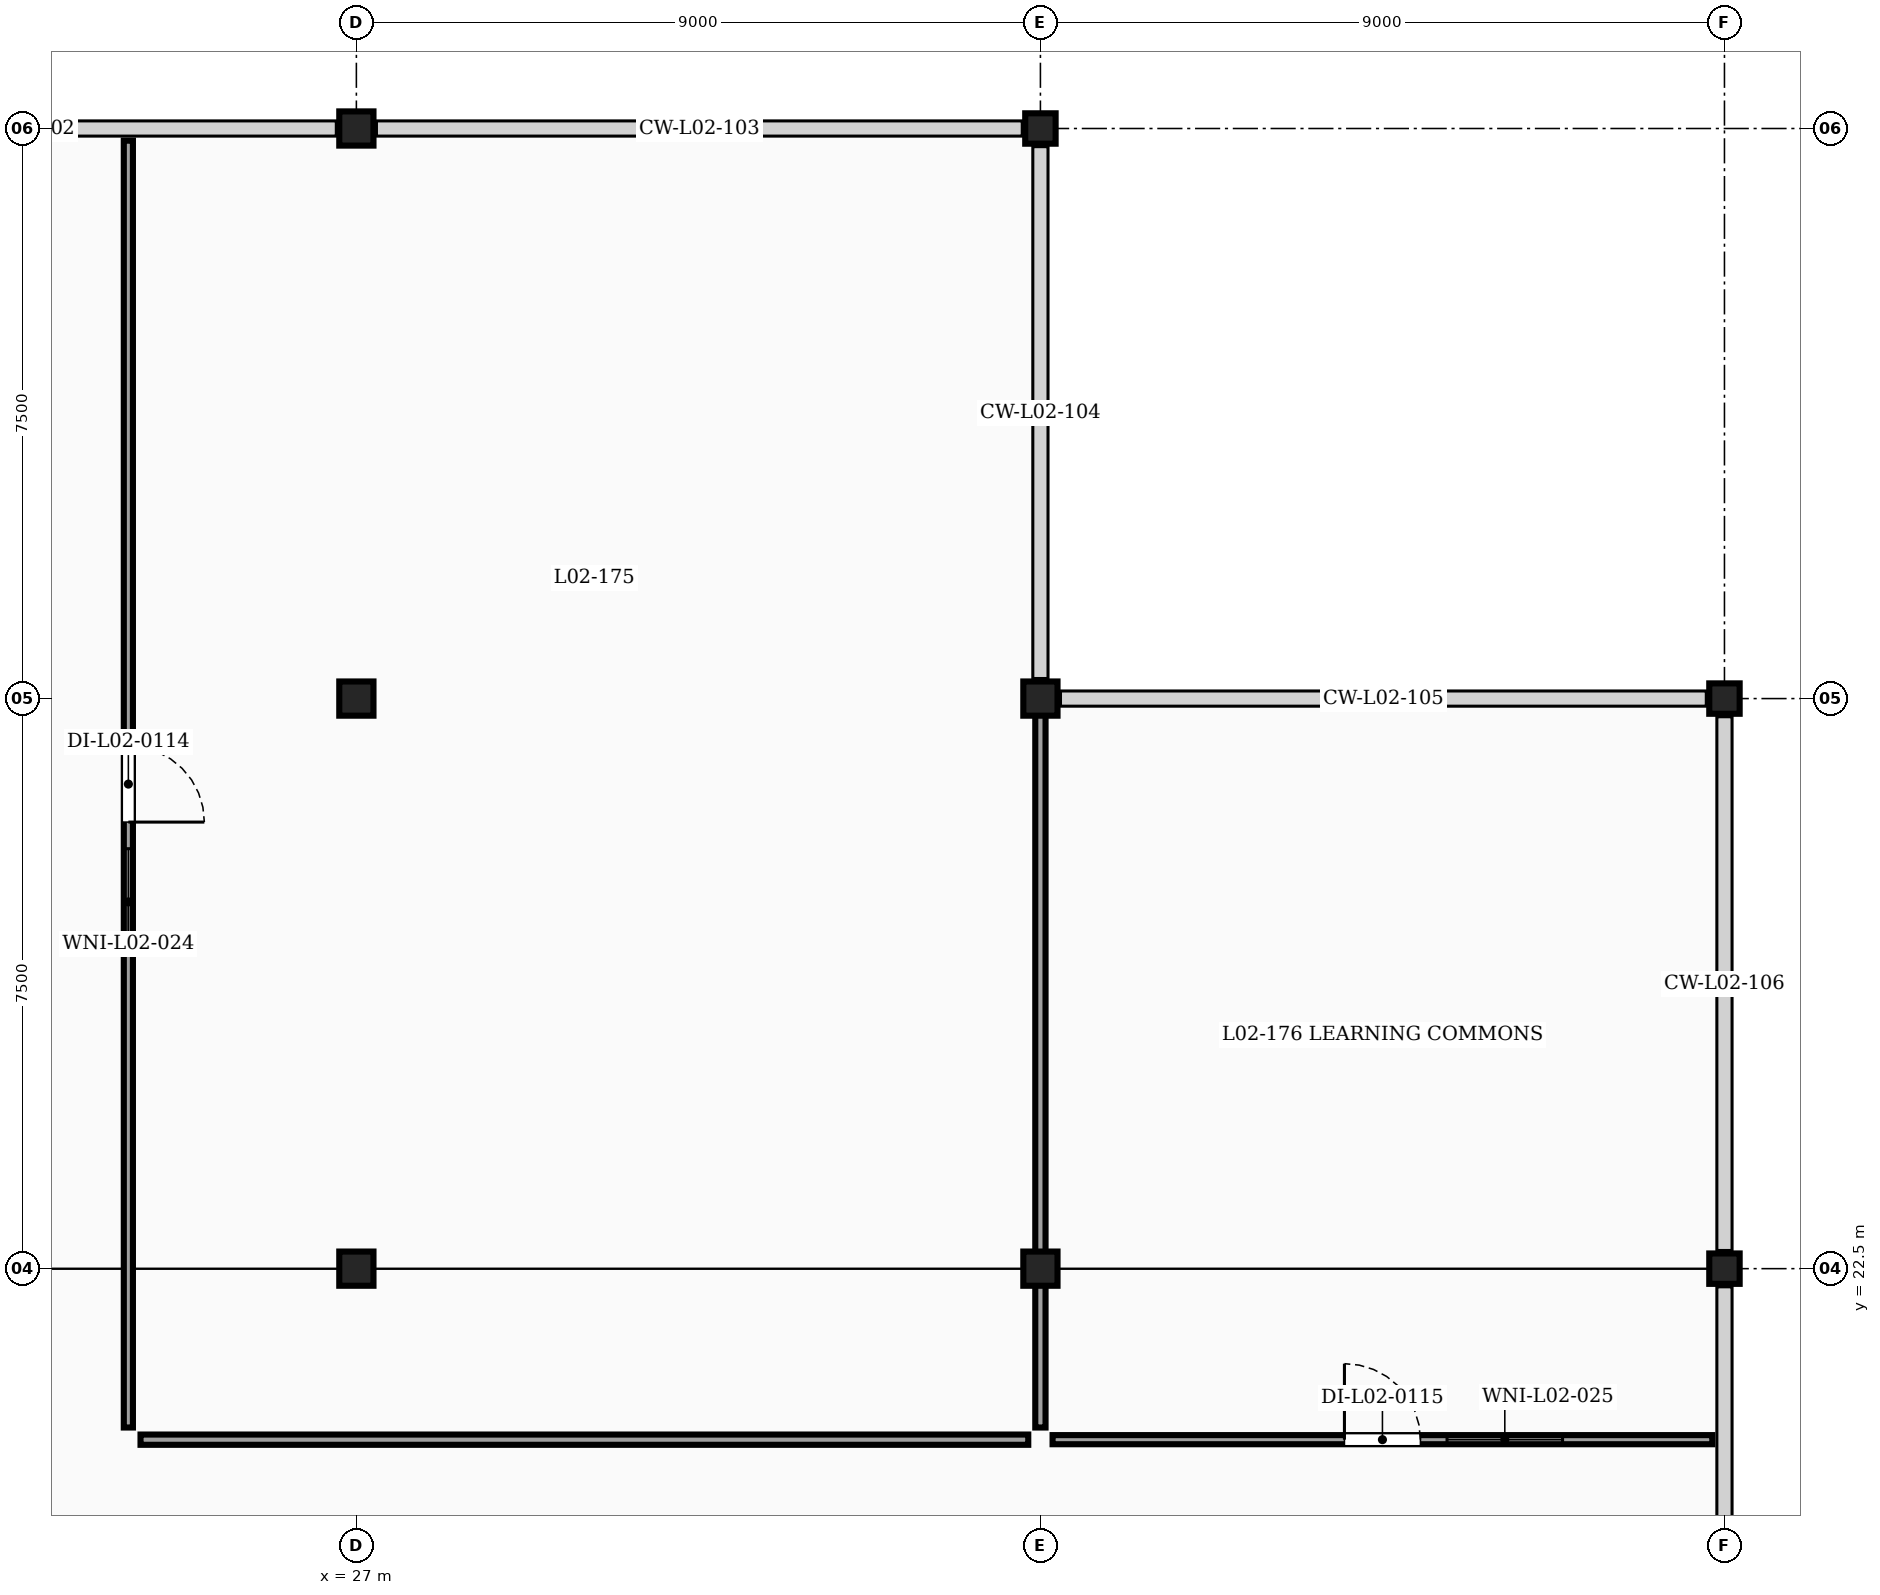
"""IFC4 building model, lengths in metres.
Left out: names, types, materials, properties, quantities, classifications, styles, units other than length and angle.
Written with IfcOpenShell. Run it as: python <this file> out.ifc"""

import sys

from ifc_helpers import new_model, si_unit, direction, frame, frame_2d, origin, origin_2d, place, context, subcontext, project, spatial, rectangle, extrude, element, fill, save


model = new_model("IFC4")
c1 = context("Model", 3, precision=1e-05, world=origin(), true_north=direction((0.0, 1.0)))
c2 = subcontext(c1, "Body", "Model", "MODEL_VIEW")
j1 = project(units=[si_unit("LENGTHUNIT", "METRE"), si_unit("PLANEANGLEUNIT", "RADIAN")], contexts=[c1])
p1 = place(None, origin())
s1 = spatial("IfcSite", under=j1, at=p1, CompositionType="ELEMENT")
p2 = place(p1, origin())
s2 = spatial("IfcBuilding", under=s1, at=p2, CompositionType="ELEMENT")
p3 = place(p2, frame((0.0, 0.0, 8.5)))
s3 = spatial("IfcBuildingStorey", under=s2, at=p3, CompositionType="ELEMENT", Elevation=8.5)
for number, where, z_axis, x_axis in (
    (1, (27.0, 22.5, 0.0), (0.0, 0.0, 1.0), (1.0, 0.0, 0.0)),
    (2, (36.0, 22.5, 0.0), (0.0, 0.0, 1.0), (1.0, 0.0, 0.0)),
):
    element("IfcColumn", number, at=place(p3, frame(where, z_axis=z_axis, x_axis=x_axis)), inside=s3, PredefinedType="COLUMN", context=c2, shape_type="SweptSolid", body=[
        extrude(rectangle(XDim=0.45, YDim=0.45, at=origin_2d()), origin(), (0.0, 0.0, 1.0), 3.8),
    ])
p4 = place(p3, frame((45.0, 22.5, 0.0), z_axis=(0.0, 0.0, 1.0), x_axis=(1.0, 0.0, 0.0)))
e3 = element("IfcColumn", 3, at=p4, inside=s3, PredefinedType="COLUMN", context=c2, shape_type="SweptSolid", body=[
    extrude(rectangle(XDim=0.4, YDim=0.4, at=origin_2d()), origin(), (0.0, 0.0, 1.0), 3.8),
])
for number, where, z_axis, x_axis in (
    (4, (27.0, 30.0, 0.0), (0.0, 0.0, 1.0), (1.0, 0.0, 0.0)),
    (5, (36.0, 30.0, 0.0), (0.0, 0.0, 1.0), (1.0, 0.0, 0.0)),
):
    element("IfcColumn", number, at=place(p3, frame(where, z_axis=z_axis, x_axis=x_axis)), inside=s3, PredefinedType="COLUMN", context=c2, shape_type="SweptSolid", body=[
        extrude(rectangle(XDim=0.45, YDim=0.45, at=origin_2d()), origin(), (0.0, 0.0, 1.0), 3.8),
    ])
p5 = place(p3, frame((45.0, 30.0, 0.0), z_axis=(0.0, 0.0, 1.0), x_axis=(1.0, 0.0, 0.0)))
e6 = element("IfcColumn", 6, at=p5, inside=s3, PredefinedType="COLUMN", context=c2, shape_type="SweptSolid", body=[
    extrude(rectangle(XDim=0.4, YDim=0.4, at=origin_2d()), origin(), (0.0, 0.0, 1.0), 3.8),
])
p6 = place(p3, frame((27.0, 37.5, 0.0), z_axis=(0.0, 0.0, 1.0), x_axis=(1.0, 0.0, 0.0)))
e7 = element("IfcColumn", 7, at=p6, inside=s3, PredefinedType="COLUMN", context=c2, shape_type="SweptSolid", body=[
    extrude(rectangle(XDim=0.45, YDim=0.45, at=origin_2d()), origin(), (0.0, 0.0, 1.0), 3.8),
])
p7 = place(p3, frame((36.0, 37.5, 0.0), z_axis=(0.0, 0.0, 1.0), x_axis=(1.0, 0.0, 0.0)))
e8 = element("IfcColumn", 8, at=p7, inside=s3, PredefinedType="COLUMN", context=c2, shape_type="SweptSolid", body=[
    extrude(rectangle(XDim=0.4, YDim=0.4, at=origin_2d()), origin(), (0.0, 0.0, 1.0), 3.8),
])
p8 = place(p3, frame((24.0, 37.34, 0.0), z_axis=(0.0, 0.0, 1.0), x_axis=(0.0, -1.0, 0.0)))
e9 = element("IfcWall", 9, at=p8, inside=s3, PredefinedType="PARTITIONING", context=c2, shape_type="SweptSolid", body=[
    extrude(rectangle(XDim=16.93, YDim=0.12, at=frame_2d((8.465, 0.0))), origin(), (0.0, 0.0, 1.0), 3.182),
])
p9 = place(p8, frame((7.965, 0.0, 0.0)))
e10 = element("IfcOpeningElement", 10, at=p9, cuts=e9, PredefinedType="OPENING", context=c2, shape_type="SweptSolid", body=[
    extrude(rectangle(XDim=1.0, YDim=2.15, at=frame_2d((0.5, 1.075))), frame((0.0, 0.07, 0.0), z_axis=(0.0, -1.0, 0.0), x_axis=(1.0, 0.0, 0.0)), (0.0, 0.0, 1.0), 0.14),
])
p10 = place(p8, frame((9.315, 0.0, 1.02)))
e11 = element("IfcOpeningElement", 11, at=p10, cuts=e9, PredefinedType="OPENING", context=c2, shape_type="SweptSolid", body=[
    extrude(rectangle(XDim=1.4, YDim=1.2, at=frame_2d((0.7, 0.6))), frame((0.0, 0.07, 0.0), z_axis=(0.0, -1.0, 0.0), x_axis=(1.0, 0.0, 0.0)), (0.0, 0.0, 1.0), 0.14),
])
p11 = place(p3, frame((24.16, 20.25, 0.0), z_axis=(0.0, 0.0, 1.0), x_axis=(1.0, 0.0, 0.0)))
e12 = element("IfcWall", 12, at=p11, inside=s3, PredefinedType="PARTITIONING", context=c2, shape_type="SweptSolid", body=[
    extrude(rectangle(XDim=11.68, YDim=0.135, at=frame_2d((5.84, 0.0))), origin(), (0.0, 0.0, 1.0), 3.59),
])
p12 = place(p3, frame((36.16, 20.25, 0.0), z_axis=(0.0, 0.0, 1.0), x_axis=(1.0, 0.0, 0.0)))
e13 = element("IfcWall", 13, at=p12, inside=s3, PredefinedType="PARTITIONING", context=c2, shape_type="SweptSolid", body=[
    extrude(rectangle(XDim=8.68, YDim=0.12, at=frame_2d((4.34, 0.0))), origin(), (0.0, 0.0, 1.0), 3.59),
])
p13 = place(p12, frame((3.84, 0.0, 0.0)))
e14 = element("IfcOpeningElement", 14, at=p13, cuts=e13, PredefinedType="OPENING", context=c2, shape_type="SweptSolid", body=[
    extrude(rectangle(XDim=1.0, YDim=2.15, at=frame_2d((0.5, 1.075))), frame((0.0, 0.07, 0.0), z_axis=(0.0, -1.0, 0.0), x_axis=(1.0, 0.0, 0.0)), (0.0, 0.0, 1.0), 0.14),
])
p14 = place(p12, frame((5.19, 0.0, 1.02)))
e15 = element("IfcOpeningElement", 15, at=p14, cuts=e13, PredefinedType="OPENING", context=c2, shape_type="SweptSolid", body=[
    extrude(rectangle(XDim=1.52, YDim=1.16, at=frame_2d((0.76, 0.58))), frame((0.0, 0.07, 0.0), z_axis=(0.0, -1.0, 0.0), x_axis=(1.0, 0.0, 0.0)), (0.0, 0.0, 1.0), 0.14),
])
p15 = place(p3, frame((36.0, 20.41, 0.0), z_axis=(0.0, 0.0, 1.0), x_axis=(0.0, 1.0, 0.0)))
e16 = element("IfcWall", 16, at=p15, inside=s3, PredefinedType="PARTITIONING", context=c2, shape_type="SweptSolid", body=[
    extrude(rectangle(XDim=9.43, YDim=0.135, at=frame_2d((4.715, 0.0))), origin(), (0.0, 0.0, 1.0), 3.049),
])
p16 = place(p9, origin())
e17 = element("IfcDoor", 17, at=p16, inside=s3, OperationType="SINGLE_SWING_RIGHT", PredefinedType="DOOR", context=c2, shape_type="SweptSolid", body=[
    extrude(rectangle(XDim=1.0, YDim=2.15, at=frame_2d((0.5, 1.075))), frame((0.0, 0.025, 0.0), z_axis=(0.0, -1.0, 0.0), x_axis=(1.0, 0.0, 0.0)), (0.0, 0.0, 1.0), 0.05),
])
fill(e10, e17)
p17 = place(p10, origin())
e18 = element("IfcWindow", 18, at=p17, inside=s3, PartitioningType="DOUBLE_PANEL_VERTICAL", PredefinedType="WINDOW", context=c2, shape_type="SweptSolid", body=[
    extrude(rectangle(XDim=1.4, YDim=1.2, at=frame_2d((0.7, 0.6))), frame((0.0, 0.03, 0.0), z_axis=(0.0, -1.0, 0.0), x_axis=(1.0, 0.0, 0.0)), (0.0, 0.0, 1.0), 0.06),
])
fill(e11, e18)
p18 = place(p13, origin())
e19 = element("IfcDoor", 19, at=p18, inside=s3, OperationType="SINGLE_SWING_LEFT", PredefinedType="DOOR", context=c2, shape_type="SweptSolid", body=[
    extrude(rectangle(XDim=1.0, YDim=2.15, at=frame_2d((0.5, 1.075))), frame((0.0, 0.025, 0.0), z_axis=(0.0, -1.0, 0.0), x_axis=(1.0, 0.0, 0.0)), (0.0, 0.0, 1.0), 0.05),
])
fill(e14, e19)
p19 = place(p14, origin())
e20 = element("IfcWindow", 20, at=p19, inside=s3, PartitioningType="DOUBLE_PANEL_VERTICAL", PredefinedType="WINDOW", context=c2, shape_type="SweptSolid", body=[
    extrude(rectangle(XDim=1.52, YDim=1.16, at=frame_2d((0.76, 0.58))), frame((0.0, 0.03, 0.0), z_axis=(0.0, -1.0, 0.0), x_axis=(1.0, 0.0, 0.0)), (0.0, 0.0, 1.0), 0.06),
])
fill(e15, e20)
save(model, sys.argv[1])
